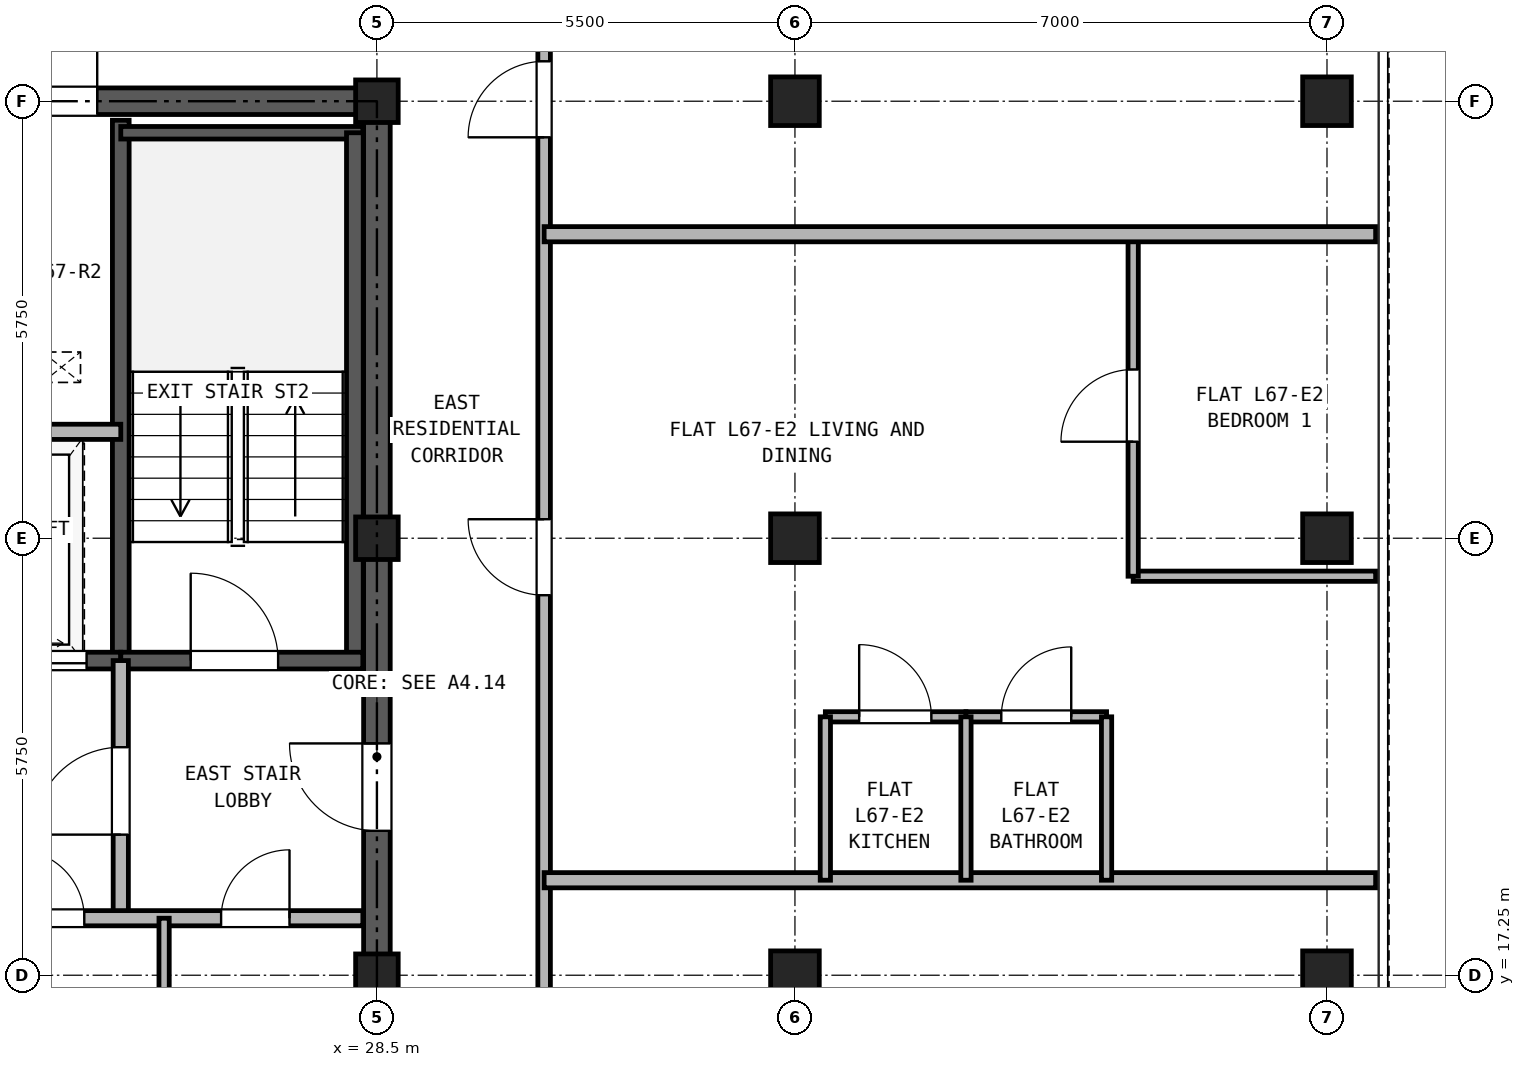
"""IFC4 building model, lengths in metres.
Left out: names, types, materials, properties, quantities, classifications, styles, units other than length and angle.
Written with IfcOpenShell. Run it as: python <this file> out.ifc"""

import sys

from ifc_helpers import new_model, si_unit, direction, frame, frame_2d, origin, origin_2d, place, context, subcontext, project, spatial, rectangle, hollow_rectangle, extrude, source, transform, mapped, element, fill, save


model = new_model("IFC4")
c1 = context("Model", 3, precision=1e-05, world=origin(), true_north=direction((0.0, 1.0)))
c2 = subcontext(c1, "Body", "Model", "MODEL_VIEW")
j1 = project(units=[si_unit("LENGTHUNIT", "METRE"), si_unit("PLANEANGLEUNIT", "RADIAN")], contexts=[c1])
p1 = place(None, origin())
s1 = spatial("IfcSite", under=j1, at=p1, CompositionType="ELEMENT")
p2 = place(p1, origin())
s2 = spatial("IfcBuilding", under=s1, at=p2, CompositionType="ELEMENT")
p3 = place(p2, frame((0.0, 0.0, 236.1)))
s3 = spatial("IfcBuildingStorey", under=s2, at=p3, CompositionType="ELEMENT", Elevation=236.1)
m1 = source(origin(), c2, "Body", "SweptSolid", [
    extrude(hollow_rectangle(XDim=0.64, YDim=0.64, WallThickness=0.035, at=origin_2d()), origin(), (0.0, 0.0, 1.0), 2.98),
])
for number, where, z_axis, x_axis in (
    (1, (41.0, 17.25, 0.0), (0.0, 0.0, 1.0), (1.0, 0.0, 0.0)),
    (2, (41.0, 23.0, 0.0), (0.0, 0.0, 1.0), (1.0, 0.0, 0.0)),
    (3, (41.0, 28.75, 0.0), (0.0, 0.0, 1.0), (1.0, 0.0, 0.0)),
):
    element("IfcColumn", number, at=place(p3, frame(where, z_axis=z_axis, x_axis=x_axis)), inside=s3, PredefinedType="COLUMN", context=c2, shape_type="MappedRepresentation", body=[
        mapped(m1, transform((0.0, 0.0, 0.0), x_axis=(1.0, 0.0, 0.0), y_axis=(0.0, 1.0, 0.0), z_axis=(0.0, 0.0, 1.0), scale=1.0)),
    ])
m2 = source(origin(), c2, "Body", "SweptSolid", [
    extrude(hollow_rectangle(XDim=0.56, YDim=0.56, WallThickness=0.03, at=origin_2d()), origin(), (0.0, 0.0, 1.0), 2.98),
])
for number, where, z_axis, x_axis in (
    (4, (28.5, 17.25, 0.0), (0.0, 0.0, 1.0), (1.0, 0.0, 0.0)),
    (5, (28.5, 23.0, 0.0), (0.0, 0.0, 1.0), (1.0, 0.0, 0.0)),
    (6, (28.5, 28.75, 0.0), (0.0, 0.0, 1.0), (1.0, 0.0, 0.0)),
):
    element("IfcColumn", number, at=place(p3, frame(where, z_axis=z_axis, x_axis=x_axis)), inside=s3, PredefinedType="COLUMN", context=c2, shape_type="MappedRepresentation", body=[
        mapped(m2, transform((0.0, 0.0, 0.0), x_axis=(1.0, 0.0, 0.0), y_axis=(0.0, 1.0, 0.0), z_axis=(0.0, 0.0, 1.0), scale=1.0)),
    ])
for number, where, z_axis, x_axis in (
    (7, (34.0, 17.25, 0.0), (0.0, 0.0, 1.0), (1.0, 0.0, 0.0)),
    (8, (34.0, 23.0, 0.0), (0.0, 0.0, 1.0), (1.0, 0.0, 0.0)),
    (9, (34.0, 28.75, 0.0), (0.0, 0.0, 1.0), (1.0, 0.0, 0.0)),
):
    element("IfcColumn", number, at=place(p3, frame(where, z_axis=z_axis, x_axis=x_axis)), inside=s3, PredefinedType="COLUMN", context=c2, shape_type="MappedRepresentation", body=[
        mapped(m1, transform((0.0, 0.0, 0.0), x_axis=(1.0, 0.0, 0.0), y_axis=(0.0, 1.0, 0.0), z_axis=(0.0, 0.0, 1.0), scale=1.0)),
    ])
p4 = place(p3, frame((18.325, 28.75, 0.0), z_axis=(0.0, 0.0, 1.0), x_axis=(1.0, 0.0, 0.0)))
e10 = element("IfcWall", 10, at=p4, inside=s3, PredefinedType="SHEAR", context=c2, shape_type="SweptSolid", body=[
    extrude(rectangle(XDim=10.35, YDim=0.35, at=frame_2d((5.175, 0.0))), origin(), (0.0, 0.0, 1.0), 2.98),
])
p5 = place(p4, frame((4.055, 0.0, 0.0)))
e11 = element("IfcOpeningElement", 11, at=p5, cuts=e10, PredefinedType="OPENING", context=c2, shape_type="SweptSolid", body=[
    extrude(rectangle(XDim=0.9, YDim=2.05, at=frame_2d((0.45, 1.025))), frame((0.0, 0.185, 0.0), z_axis=(0.0, -1.0, 0.0), x_axis=(1.0, 0.0, 0.0)), (0.0, 0.0, 1.0), 0.37),
])
p6 = place(p4, frame((5.595, 0.0, 0.0)))
e12 = element("IfcOpeningElement", 12, at=p6, cuts=e10, PredefinedType="OPENING", context=c2, shape_type="SweptSolid", body=[
    extrude(rectangle(XDim=0.9, YDim=2.05, at=frame_2d((0.45, 1.025))), frame((0.0, 0.185, 0.0), z_axis=(0.0, -1.0, 0.0), x_axis=(1.0, 0.0, 0.0)), (0.0, 0.0, 1.0), 0.37),
])
p7 = place(p3, frame((28.5, 11.675, 0.0), z_axis=(0.0, 0.0, 1.0), x_axis=(0.0, 1.0, 0.0)))
e13 = element("IfcWall", 13, at=p7, inside=s3, PredefinedType="SHEAR", context=c2, shape_type="SweptSolid", body=[
    extrude(rectangle(XDim=16.9, YDim=0.35, at=frame_2d((8.45, 0.0))), origin(), (0.0, 0.0, 1.0), 2.98),
])
p8 = place(p7, frame((7.475, 0.0, 0.0)))
e14 = element("IfcOpeningElement", 14, at=p8, cuts=e13, PredefinedType="OPENING", context=c2, shape_type="SweptSolid", body=[
    extrude(rectangle(XDim=1.15, YDim=2.2, at=frame_2d((0.575, 1.1))), frame((0.0, 0.185, 0.0), z_axis=(0.0, -1.0, 0.0), x_axis=(1.0, 0.0, 0.0)), (0.0, 0.0, 1.0), 0.37),
])
p9 = place(p3, frame((25.13, 21.39, 0.0), z_axis=(0.0, 0.0, 1.0), x_axis=(0.0, 1.0, 0.0)))
e15 = element("IfcWall", 15, at=p9, inside=s3, PredefinedType="SOLIDWALL", context=c2, shape_type="SweptSolid", body=[
    extrude(rectangle(XDim=7.11, YDim=0.22, at=frame_2d((3.555, 0.0))), origin(), (0.0, 0.0, 1.0), 2.98),
])
p10 = place(p3, frame((25.13, 28.335, 0.0), z_axis=(0.0, 0.0, 1.0), x_axis=(1.0, 0.0, 0.0)))
e16 = element("IfcWall", 16, at=p10, inside=s3, PredefinedType="PARTITIONING", context=c2, shape_type="SweptSolid", body=[
    extrude(rectangle(XDim=3.185, YDim=0.165, at=frame_2d((1.593, 0.0))), origin(), (0.0, 0.0, 1.0), 2.98),
])
p11 = place(p3, frame((28.21, 21.39, 0.0), z_axis=(0.0, 0.0, 1.0), x_axis=(0.0, 1.0, 0.0)))
e17 = element("IfcWall", 17, at=p11, inside=s3, PredefinedType="SOLIDWALL", context=c2, shape_type="SweptSolid", body=[
    extrude(rectangle(XDim=6.945, YDim=0.22, at=frame_2d((3.473, 0.0))), origin(), (0.0, 0.0, 1.0), 2.98),
])
p12 = place(p3, frame((18.685, 21.39, 0.0), z_axis=(0.0, 0.0, 1.0), x_axis=(1.0, 0.0, 0.0)))
e18 = element("IfcWall", 18, at=p12, inside=s3, PredefinedType="SOLIDWALL", context=c2, shape_type="SweptSolid", body=[
    extrude(rectangle(XDim=6.445, YDim=0.22, at=frame_2d((3.222, 0.0))), origin(), (0.0, 0.0, 1.0), 2.98),
])
p13 = place(p12, frame((1.165, 0.0, 0.0)))
e19 = element("IfcOpeningElement", 19, at=p13, cuts=e18, PredefinedType="OPENING", context=c2, shape_type="SweptSolid", body=[
    extrude(rectangle(XDim=1.15, YDim=2.2, at=frame_2d((0.575, 1.1))), frame((0.0, 0.12, 0.0), z_axis=(0.0, -1.0, 0.0), x_axis=(1.0, 0.0, 0.0)), (0.0, 0.0, 1.0), 0.24),
])
p14 = place(p12, frame((4.895, 0.0, 0.0)))
e20 = element("IfcOpeningElement", 20, at=p14, cuts=e18, PredefinedType="OPENING", context=c2, shape_type="SweptSolid", body=[
    extrude(rectangle(XDim=1.1, YDim=2.25, at=frame_2d((0.55, 1.125))), frame((0.0, 0.12, 0.0), z_axis=(0.0, -1.0, 0.0), x_axis=(1.0, 0.0, 0.0)), (0.0, 0.0, 1.0), 0.24),
])
p15 = place(p3, frame((25.13, 21.39, 0.0), z_axis=(0.0, 0.0, 1.0), x_axis=(1.0, 0.0, 0.0)))
e21 = element("IfcWall", 21, at=p15, inside=s3, PredefinedType="SOLIDWALL", context=c2, shape_type="SweptSolid", body=[
    extrude(rectangle(XDim=3.185, YDim=0.22, at=frame_2d((1.593, 0.0))), origin(), (0.0, 0.0, 1.0), 2.98),
])
p16 = place(p15, frame((0.92, 0.0, 0.0)))
e22 = element("IfcOpeningElement", 22, at=p16, cuts=e21, PredefinedType="OPENING", context=c2, shape_type="SweptSolid", body=[
    extrude(rectangle(XDim=1.15, YDim=2.2, at=frame_2d((0.575, 1.1))), frame((0.0, 0.12, 0.0), z_axis=(0.0, -1.0, 0.0), x_axis=(1.0, 0.0, 0.0)), (0.0, 0.0, 1.0), 0.24),
])
p17 = place(p3, frame((22.11, 24.4, 0.0), z_axis=(0.0, 0.0, 1.0), x_axis=(1.0, 0.0, 0.0)))
e23 = element("IfcWall", 23, at=p17, inside=s3, PredefinedType="PARTITIONING", context=c2, shape_type="SweptSolid", body=[
    extrude(rectangle(XDim=3.02, YDim=0.2, at=frame_2d((1.51, 0.0))), origin(), (0.0, 0.0, 1.0), 2.98),
])
p18 = place(p3, frame((25.13, 18.0, 0.0), z_axis=(0.0, 0.0, 1.0), x_axis=(0.0, 1.0, 0.0)))
e24 = element("IfcWall", 24, at=p18, inside=s3, PredefinedType="PARTITIONING", context=c2, shape_type="SweptSolid", body=[
    extrude(rectangle(XDim=3.39, YDim=0.2, at=frame_2d((1.695, 0.0))), origin(), (0.0, 0.0, 1.0), 2.98),
])
p19 = place(p18, frame((1.1, 0.0, 0.0)))
e25 = element("IfcOpeningElement", 25, at=p19, cuts=e24, PredefinedType="OPENING", context=c2, shape_type="SweptSolid", body=[
    extrude(rectangle(XDim=1.15, YDim=2.2, at=frame_2d((0.575, 1.1))), frame((0.0, 0.11, 0.0), z_axis=(0.0, -1.0, 0.0), x_axis=(1.0, 0.0, 0.0)), (0.0, 0.0, 1.0), 0.22),
])
p20 = place(p3, frame((18.685, 18.0, 0.0), z_axis=(0.0, 0.0, 1.0), x_axis=(1.0, 0.0, 0.0)))
e26 = element("IfcWall", 26, at=p20, inside=s3, PredefinedType="PARTITIONING", context=c2, shape_type="SweptSolid", body=[
    extrude(rectangle(XDim=9.63, YDim=0.2, at=frame_2d((4.815, 0.0))), origin(), (0.0, 0.0, 1.0), 2.98),
])
p21 = place(p20, frame((0.565, 0.0, 0.0)))
e27 = element("IfcOpeningElement", 27, at=p21, cuts=e26, PredefinedType="OPENING", context=c2, shape_type="SweptSolid", body=[
    extrude(rectangle(XDim=1.3, YDim=2.3, at=frame_2d((0.65, 1.15))), frame((0.0, 0.11, 0.0), z_axis=(0.0, -1.0, 0.0), x_axis=(1.0, 0.0, 0.0)), (0.0, 0.0, 1.0), 0.22),
])
p22 = place(p20, frame((2.665, 0.0, 0.0)))
e28 = element("IfcOpeningElement", 28, at=p22, cuts=e26, PredefinedType="OPENING", context=c2, shape_type="SweptSolid", body=[
    extrude(rectangle(XDim=1.3, YDim=2.3, at=frame_2d((0.65, 1.15))), frame((0.0, 0.11, 0.0), z_axis=(0.0, -1.0, 0.0), x_axis=(1.0, 0.0, 0.0)), (0.0, 0.0, 1.0), 0.22),
])
p23 = place(p20, frame((5.065, 0.0, 0.0)))
e29 = element("IfcOpeningElement", 29, at=p23, cuts=e26, PredefinedType="OPENING", context=c2, shape_type="SweptSolid", body=[
    extrude(rectangle(XDim=0.9, YDim=2.05, at=frame_2d((0.45, 1.025))), frame((0.0, 0.11, 0.0), z_axis=(0.0, -1.0, 0.0), x_axis=(1.0, 0.0, 0.0)), (0.0, 0.0, 1.0), 0.22),
])
p24 = place(p20, frame((7.765, 0.0, 0.0)))
e30 = element("IfcOpeningElement", 30, at=p24, cuts=e26, PredefinedType="OPENING", context=c2, shape_type="SweptSolid", body=[
    extrude(rectangle(XDim=0.9, YDim=2.05, at=frame_2d((0.45, 1.025))), frame((0.0, 0.11, 0.0), z_axis=(0.0, -1.0, 0.0), x_axis=(1.0, 0.0, 0.0)), (0.0, 0.0, 1.0), 0.22),
])
p25 = place(p3, frame((25.7, 15.0, 0.0), z_axis=(0.0, 0.0, 1.0), x_axis=(0.0, 1.0, 0.0)))
e31 = element("IfcWall", 31, at=p25, inside=s3, PredefinedType="PARTITIONING", context=c2, shape_type="SweptSolid", body=[
    extrude(rectangle(XDim=3.0, YDim=0.135, at=frame_2d((1.5, 0.0))), origin(), (0.0, 0.0, 1.0), 2.98),
])
p26 = place(p3, frame((30.7, 11.45, 0.0), z_axis=(0.0, 0.0, 1.0), x_axis=(0.0, 1.0, 0.0)))
e32 = element("IfcWall", 32, at=p26, inside=s3, PredefinedType="PARTITIONING", context=c2, shape_type="SweptSolid", body=[
    extrude(rectangle(XDim=23.69, YDim=0.165, at=frame_2d((11.845, 0.0))), origin(), (0.0, 0.0, 1.0), 2.98),
])
p27 = place(p26, frame((3.025, 0.0, 0.0)))
e33 = element("IfcOpeningElement", 33, at=p27, cuts=e32, PredefinedType="OPENING", context=c2, shape_type="SweptSolid", body=[
    extrude(rectangle(XDim=1.0, YDim=2.15, at=frame_2d((0.5, 1.075))), frame((0.0, 0.093, 0.0), z_axis=(0.0, -1.0, 0.0), x_axis=(1.0, 0.0, 0.0)), (0.0, 0.0, 1.0), 0.185),
])
p28 = place(p26, frame((10.8, 0.0, 0.0)))
e34 = element("IfcOpeningElement", 34, at=p28, cuts=e32, PredefinedType="OPENING", context=c2, shape_type="SweptSolid", body=[
    extrude(rectangle(XDim=1.0, YDim=2.15, at=frame_2d((0.5, 1.075))), frame((0.0, 0.093, 0.0), z_axis=(0.0, -1.0, 0.0), x_axis=(1.0, 0.0, 0.0)), (0.0, 0.0, 1.0), 0.185),
])
p29 = place(p26, frame((16.825, 0.0, 0.0)))
e35 = element("IfcOpeningElement", 35, at=p29, cuts=e32, PredefinedType="OPENING", context=c2, shape_type="SweptSolid", body=[
    extrude(rectangle(XDim=1.0, YDim=2.15, at=frame_2d((0.5, 1.075))), frame((0.0, 0.093, 0.0), z_axis=(0.0, -1.0, 0.0), x_axis=(1.0, 0.0, 0.0)), (0.0, 0.0, 1.0), 0.185),
])
p30 = place(p3, frame((30.7, 18.5, 0.0), z_axis=(0.0, 0.0, 1.0), x_axis=(1.0, 0.0, 0.0)))
e36 = element("IfcWall", 36, at=p30, inside=s3, PredefinedType="PARTITIONING", context=c2, shape_type="SweptSolid", body=[
    extrude(rectangle(XDim=10.94, YDim=0.2, at=frame_2d((5.47, 0.0))), origin(), (0.0, 0.0, 1.0), 2.98),
])
p31 = place(p3, frame((34.4, 20.65, 0.0), z_axis=(0.0, 0.0, 1.0), x_axis=(1.0, 0.0, 0.0)))
e37 = element("IfcWall", 37, at=p31, inside=s3, PredefinedType="PARTITIONING", context=c2, shape_type="SweptSolid", body=[
    extrude(rectangle(XDim=1.85, YDim=0.135, at=frame_2d((0.925, 0.0))), origin(), (0.0, 0.0, 1.0), 2.98),
])
p32 = place(p31, frame((0.445, 0.0, 0.0)))
e38 = element("IfcOpeningElement", 38, at=p32, cuts=e37, PredefinedType="OPENING", context=c2, shape_type="SweptSolid", body=[
    extrude(rectangle(XDim=0.95, YDim=2.15, at=frame_2d((0.475, 1.075))), frame((0.0, 0.077, 0.0), z_axis=(0.0, -1.0, 0.0), x_axis=(1.0, 0.0, 0.0)), (0.0, 0.0, 1.0), 0.155),
])
p33 = place(p3, frame((36.25, 20.65, 0.0), z_axis=(0.0, 0.0, 1.0), x_axis=(1.0, 0.0, 0.0)))
e39 = element("IfcWall", 39, at=p33, inside=s3, PredefinedType="PARTITIONING", context=c2, shape_type="SweptSolid", body=[
    extrude(rectangle(XDim=1.85, YDim=0.135, at=frame_2d((0.925, 0.0))), origin(), (0.0, 0.0, 1.0), 2.98),
])
p34 = place(p33, frame((0.465, 0.0, 0.0)))
e40 = element("IfcOpeningElement", 40, at=p34, cuts=e39, PredefinedType="OPENING", context=c2, shape_type="SweptSolid", body=[
    extrude(rectangle(XDim=0.92, YDim=2.1, at=frame_2d((0.46, 1.05))), frame((0.0, 0.077, 0.0), z_axis=(0.0, -1.0, 0.0), x_axis=(1.0, 0.0, 0.0)), (0.0, 0.0, 1.0), 0.155),
])
for number, where, z_axis, x_axis in (
    (41, (34.4, 18.5, 0.0), (0.0, 0.0, 1.0), (0.0, 1.0, 0.0)),
    (42, (36.25, 18.5, 0.0), (0.0, 0.0, 1.0), (0.0, 1.0, 0.0)),
    (43, (38.1, 18.5, 0.0), (0.0, 0.0, 1.0), (0.0, 1.0, 0.0)),
):
    element("IfcWall", number, at=place(p3, frame(where, z_axis=z_axis, x_axis=x_axis)), inside=s3, PredefinedType="PARTITIONING", context=c2, shape_type="SweptSolid", body=[
        extrude(rectangle(XDim=2.15, YDim=0.135, at=frame_2d((1.075, 0.0))), origin(), (0.0, 0.0, 1.0), 2.98),
    ])
p35 = place(p3, frame((38.45, 22.5, 0.0), z_axis=(0.0, 0.0, 1.0), x_axis=(1.0, 0.0, 0.0)))
e44 = element("IfcWall", 44, at=p35, inside=s3, PredefinedType="PARTITIONING", context=c2, shape_type="SweptSolid", body=[
    extrude(rectangle(XDim=3.19, YDim=0.135, at=frame_2d((1.595, 0.0))), origin(), (0.0, 0.0, 1.0), 2.98),
])
p36 = place(p3, frame((38.45, 22.5, 0.0), z_axis=(0.0, 0.0, 1.0), x_axis=(0.0, 1.0, 0.0)))
e45 = element("IfcWall", 45, at=p36, inside=s3, PredefinedType="PARTITIONING", context=c2, shape_type="SweptSolid", body=[
    extrude(rectangle(XDim=4.5, YDim=0.135, at=frame_2d((2.25, 0.0))), origin(), (0.0, 0.0, 1.0), 2.98),
])
p37 = place(p36, frame((1.77, 0.0, 0.0)))
e46 = element("IfcOpeningElement", 46, at=p37, cuts=e45, PredefinedType="OPENING", context=c2, shape_type="SweptSolid", body=[
    extrude(rectangle(XDim=0.95, YDim=2.15, at=frame_2d((0.475, 1.075))), frame((0.0, 0.077, 0.0), z_axis=(0.0, -1.0, 0.0), x_axis=(1.0, 0.0, 0.0)), (0.0, 0.0, 1.0), 0.155),
])
p38 = place(p3, frame((30.7, 27.0, 0.0), z_axis=(0.0, 0.0, 1.0), x_axis=(1.0, 0.0, 0.0)))
e47 = element("IfcWall", 47, at=p38, inside=s3, PredefinedType="PARTITIONING", context=c2, shape_type="SweptSolid", body=[
    extrude(rectangle(XDim=10.94, YDim=0.2, at=frame_2d((5.47, 0.0))), origin(), (0.0, 0.0, 1.0), 2.98),
])
p39 = place(p16, frame((1.15, 0.0, 0.0), z_axis=(0.0, 0.0, 1.0), x_axis=(-1.0, 0.0, 0.0)))
e48 = element("IfcDoor", 48, at=p39, inside=s3, OperationType="SINGLE_SWING_LEFT", PredefinedType="DOOR", context=c2, shape_type="SweptSolid", body=[
    extrude(rectangle(XDim=1.15, YDim=2.2, at=frame_2d((0.575, 1.1))), frame((0.0, 0.025, 0.0), z_axis=(0.0, -1.0, 0.0), x_axis=(1.0, 0.0, 0.0)), (0.0, 0.0, 1.0), 0.05),
])
fill(e22, e48)
p40 = place(p14, frame((1.1, 0.0, 0.0), z_axis=(0.0, 0.0, 1.0), x_axis=(-1.0, 0.0, 0.0)))
e49 = element("IfcDoor", 49, at=p40, inside=s3, OperationType="DOUBLE_DOOR_SLIDING", PredefinedType="DOOR", context=c2, shape_type="SweptSolid", body=[
    extrude(rectangle(XDim=1.1, YDim=2.25, at=frame_2d((0.55, 1.125))), frame((0.0, 0.025, 0.0), z_axis=(0.0, -1.0, 0.0), x_axis=(1.0, 0.0, 0.0)), (0.0, 0.0, 1.0), 0.05),
])
fill(e20, e49)
p41 = place(p19, origin())
e50 = element("IfcDoor", 50, at=p41, inside=s3, OperationType="SINGLE_SWING_LEFT", PredefinedType="DOOR", context=c2, shape_type="SweptSolid", body=[
    extrude(rectangle(XDim=1.15, YDim=2.2, at=frame_2d((0.575, 1.1))), frame((0.0, 0.025, 0.0), z_axis=(0.0, -1.0, 0.0), x_axis=(1.0, 0.0, 0.0)), (0.0, 0.0, 1.0), 0.05),
])
fill(e25, e50)
p42 = place(p23, frame((0.9, 0.0, 0.0), z_axis=(0.0, 0.0, 1.0), x_axis=(-1.0, 0.0, 0.0)))
e51 = element("IfcDoor", 51, at=p42, inside=s3, OperationType="SINGLE_SWING_LEFT", PredefinedType="DOOR", context=c2, shape_type="SweptSolid", body=[
    extrude(rectangle(XDim=0.9, YDim=2.05, at=frame_2d((0.45, 1.025))), frame((0.0, 0.025, 0.0), z_axis=(0.0, -1.0, 0.0), x_axis=(1.0, 0.0, 0.0)), (0.0, 0.0, 1.0), 0.05),
])
fill(e29, e51)
p43 = place(p24, frame((0.9, 0.0, 0.0), z_axis=(0.0, 0.0, 1.0), x_axis=(-1.0, 0.0, 0.0)))
e52 = element("IfcDoor", 52, at=p43, inside=s3, OperationType="SINGLE_SWING_RIGHT", PredefinedType="DOOR", context=c2, shape_type="SweptSolid", body=[
    extrude(rectangle(XDim=0.9, YDim=2.05, at=frame_2d((0.45, 1.025))), frame((0.0, 0.025, 0.0), z_axis=(0.0, -1.0, 0.0), x_axis=(1.0, 0.0, 0.0)), (0.0, 0.0, 1.0), 0.05),
])
fill(e30, e52)
p44 = place(p8, origin())
e53 = element("IfcDoor", 53, at=p44, inside=s3, OperationType="SINGLE_SWING_RIGHT", PredefinedType="DOOR", context=c2, shape_type="SweptSolid", body=[
    extrude(rectangle(XDim=1.15, YDim=2.2, at=frame_2d((0.575, 1.1))), frame((0.0, 0.025, 0.0), z_axis=(0.0, -1.0, 0.0), x_axis=(1.0, 0.0, 0.0)), (0.0, 0.0, 1.0), 0.05),
])
fill(e14, e53)
p45 = place(p6, origin())
e54 = element("IfcDoor", 54, at=p45, inside=s3, OperationType="SINGLE_SWING_RIGHT", PredefinedType="DOOR", context=c2, shape_type="SweptSolid", body=[
    extrude(rectangle(XDim=0.9, YDim=2.05, at=frame_2d((0.45, 1.025))), frame((0.0, 0.025, 0.0), z_axis=(0.0, -1.0, 0.0), x_axis=(1.0, 0.0, 0.0)), (0.0, 0.0, 1.0), 0.05),
])
fill(e12, e54)
p46 = place(p32, origin())
e55 = element("IfcDoor", 55, at=p46, inside=s3, OperationType="SINGLE_SWING_LEFT", PredefinedType="DOOR", context=c2, shape_type="SweptSolid", body=[
    extrude(rectangle(XDim=0.95, YDim=2.15, at=frame_2d((0.475, 1.075))), frame((0.0, 0.025, 0.0), z_axis=(0.0, -1.0, 0.0), x_axis=(1.0, 0.0, 0.0)), (0.0, 0.0, 1.0), 0.05),
])
fill(e38, e55)
p47 = place(p34, origin())
e56 = element("IfcDoor", 56, at=p47, inside=s3, OperationType="SINGLE_SWING_RIGHT", PredefinedType="DOOR", context=c2, shape_type="SweptSolid", body=[
    extrude(rectangle(XDim=0.92, YDim=2.1, at=frame_2d((0.46, 1.05))), frame((0.0, 0.025, 0.0), z_axis=(0.0, -1.0, 0.0), x_axis=(1.0, 0.0, 0.0)), (0.0, 0.0, 1.0), 0.05),
])
fill(e40, e56)
p48 = place(p37, frame((0.95, 0.0, 0.0), z_axis=(0.0, 0.0, 1.0), x_axis=(-1.0, 0.0, 0.0)))
e57 = element("IfcDoor", 57, at=p48, inside=s3, OperationType="SINGLE_SWING_LEFT", PredefinedType="DOOR", context=c2, shape_type="SweptSolid", body=[
    extrude(rectangle(XDim=0.95, YDim=2.15, at=frame_2d((0.475, 1.075))), frame((0.0, 0.025, 0.0), z_axis=(0.0, -1.0, 0.0), x_axis=(1.0, 0.0, 0.0)), (0.0, 0.0, 1.0), 0.05),
])
fill(e46, e57)
p49 = place(p28, frame((1.0, 0.0, 0.0), z_axis=(0.0, 0.0, 1.0), x_axis=(-1.0, 0.0, 0.0)))
e58 = element("IfcDoor", 58, at=p49, inside=s3, OperationType="SINGLE_SWING_RIGHT", PredefinedType="DOOR", context=c2, shape_type="SweptSolid", body=[
    extrude(rectangle(XDim=1.0, YDim=2.15, at=frame_2d((0.5, 1.075))), frame((0.0, 0.025, 0.0), z_axis=(0.0, -1.0, 0.0), x_axis=(1.0, 0.0, 0.0)), (0.0, 0.0, 1.0), 0.05),
])
fill(e34, e58)
p50 = place(p29, frame((1.0, 0.0, 0.0), z_axis=(0.0, 0.0, 1.0), x_axis=(-1.0, 0.0, 0.0)))
e59 = element("IfcDoor", 59, at=p50, inside=s3, OperationType="SINGLE_SWING_LEFT", PredefinedType="DOOR", context=c2, shape_type="SweptSolid", body=[
    extrude(rectangle(XDim=1.0, YDim=2.15, at=frame_2d((0.5, 1.075))), frame((0.0, 0.025, 0.0), z_axis=(0.0, -1.0, 0.0), x_axis=(1.0, 0.0, 0.0)), (0.0, 0.0, 1.0), 0.05),
])
fill(e35, e59)
save(model, sys.argv[1])
